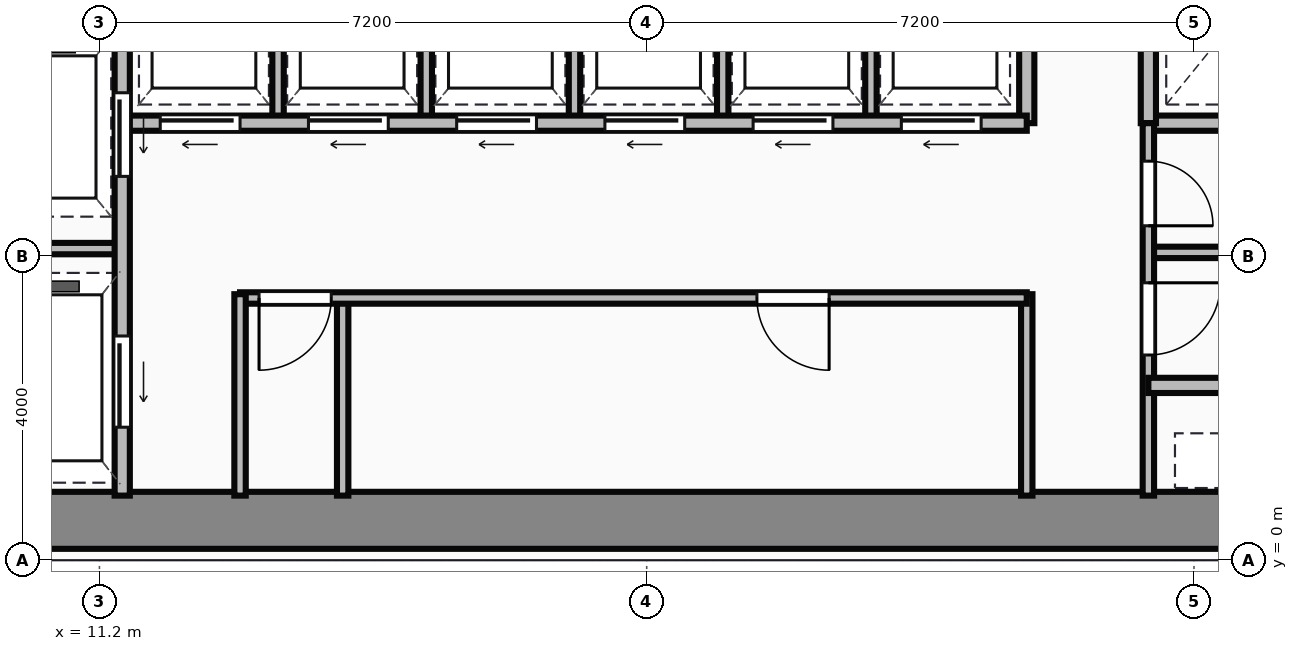
"""IFC4 building model, lengths in metres.
Left out: names, types, materials, properties, quantities, classifications, styles, units other than length and angle.
Written with IfcOpenShell. Run it as: python <this file> out.ifc"""

import sys

from ifc_helpers import new_model, si_unit, direction, frame, frame_2d, origin, place, context, subcontext, project, spatial, rectangle, extrude, source, transform, mapped, element, fill, save


model = new_model("IFC4")
c1 = context("Model", 3, precision=1e-05, world=origin(), true_north=direction((0.0, 1.0)))
c2 = subcontext(c1, "Body", "Model", "MODEL_VIEW")
j1 = project(units=[si_unit("LENGTHUNIT", "METRE"), si_unit("PLANEANGLEUNIT", "RADIAN")], contexts=[c1])
p1 = place(None, origin())
s1 = spatial("IfcSite", under=j1, at=p1, CompositionType="ELEMENT")
p2 = place(p1, origin())
s2 = spatial("IfcBuilding", under=s1, at=p2, CompositionType="ELEMENT")
p3 = place(p2, frame((0.0, 0.0, 166.15)))
s3 = spatial("IfcBuildingStorey", under=s2, at=p3, CompositionType="ELEMENT", Elevation=166.15)
m1 = source(origin(), c2, "Body", "SweptSolid", [
    extrude(rectangle(XDim=29.5, YDim=0.75, at=frame_2d((14.75, 0.0))), origin(), (0.0, 0.0, 1.0), 3.65),
])
p4 = place(p3, frame((4.5, 0.525, 0.0), z_axis=(0.0, 0.0, 1.0), x_axis=(1.0, 0.0, 0.0)))
e1 = element("IfcWall", 1, at=p4, inside=s3, PredefinedType="SHEAR", context=c2, shape_type="MappedRepresentation", body=[
    mapped(m1, transform((0.0, 0.0, 0.0))),
])
m2 = source(origin(), c2, "Body", "SweptSolid", [
    extrude(rectangle(XDim=9.6, YDim=0.2, at=frame_2d((4.8, 0.0))), origin(), (0.0, 0.0, 1.0), 3.4),
])
p5 = place(p3, frame((11.5, 0.85, 0.0), z_axis=(0.0, 0.0, 1.0), x_axis=(0.0, 1.0, 0.0)))
e2 = element("IfcWall", 2, at=p5, inside=s3, PredefinedType="PARTITIONING", context=c2, shape_type="MappedRepresentation", body=[
    mapped(m2, transform((0.0, 0.0, 0.0))),
])
p6 = place(p5, frame((4.2, 0.0, 0.0)))
e3 = element("IfcOpeningElement", 3, at=p6, cuts=e2, PredefinedType="OPENING", context=c2, shape_type="SweptSolid", body=[
    extrude(rectangle(XDim=1.1, YDim=2.15, at=frame_2d((0.55, 1.075))), frame((0.0, 0.11, 0.0), z_axis=(0.0, -1.0, 0.0), x_axis=(1.0, 0.0, 0.0)), (0.0, 0.0, 1.0), 0.22),
])
p7 = place(p5, frame((0.9, 0.0, 0.0)))
e4 = element("IfcOpeningElement", 4, at=p7, cuts=e2, PredefinedType="OPENING", context=c2, shape_type="SweptSolid", body=[
    extrude(rectangle(XDim=1.2, YDim=2.15, at=frame_2d((0.6, 1.075))), frame((0.0, 0.11, 0.0), z_axis=(0.0, -1.0, 0.0), x_axis=(1.0, 0.0, 0.0)), (0.0, 0.0, 1.0), 0.22),
])
m3 = source(origin(), c2, "Body", "SweptSolid", [
    extrude(rectangle(XDim=2.4, YDim=0.15, at=frame_2d((1.2, 0.0))), origin(), (0.0, 0.0, 1.0), 3.4),
])
p8 = place(p3, frame((9.1, 4.1, 0.0), z_axis=(0.0, 0.0, 1.0), x_axis=(1.0, 0.0, 0.0)))
e5 = element("IfcWall", 5, at=p8, inside=s3, PredefinedType="PARTITIONING", context=c2, shape_type="MappedRepresentation", body=[
    mapped(m3, transform((0.0, 0.0, 0.0))),
])
m4 = source(origin(), c2, "Body", "SweptSolid", [
    extrude(rectangle(XDim=2.65, YDim=0.15, at=frame_2d((1.325, 0.0))), origin(), (0.0, 0.0, 1.0), 3.4),
])
p9 = place(p3, frame((13.05, 0.85, 0.0), z_axis=(0.0, 0.0, 1.0), x_axis=(0.0, 1.0, 0.0)))
e6 = element("IfcWall", 6, at=p9, inside=s3, PredefinedType="PARTITIONING", context=c2, shape_type="MappedRepresentation", body=[
    mapped(m4, transform((0.0, 0.0, 0.0))),
])
m5 = source(origin(), c2, "Body", "SweptSolid", [
    extrude(rectangle(XDim=10.35, YDim=0.15, at=frame_2d((5.175, 0.0))), origin(), (0.0, 0.0, 1.0), 3.4),
])
p10 = place(p3, frame((13.05, 3.45, 0.0), z_axis=(0.0, 0.0, 1.0), x_axis=(1.0, 0.0, 0.0)))
e7 = element("IfcWall", 7, at=p10, inside=s3, PredefinedType="PARTITIONING", context=c2, shape_type="MappedRepresentation", body=[
    mapped(m5, transform((0.0, 0.0, 0.0))),
])
p11 = place(p10, frame((0.25, 0.0, 0.0)))
e8 = element("IfcOpeningElement", 8, at=p11, cuts=e7, PredefinedType="OPENING", context=c2, shape_type="SweptSolid", body=[
    extrude(rectangle(XDim=0.95, YDim=2.15, at=frame_2d((0.475, 1.075))), frame((0.0, 0.085, 0.0), z_axis=(0.0, -1.0, 0.0), x_axis=(1.0, 0.0, 0.0)), (0.0, 0.0, 1.0), 0.17),
])
p12 = place(p10, frame((6.8, 0.0, 0.0)))
e9 = element("IfcOpeningElement", 9, at=p12, cuts=e7, PredefinedType="OPENING", context=c2, shape_type="SweptSolid", body=[
    extrude(rectangle(XDim=0.95, YDim=2.15, at=frame_2d((0.475, 1.075))), frame((0.0, 0.085, 0.0), z_axis=(0.0, -1.0, 0.0), x_axis=(1.0, 0.0, 0.0)), (0.0, 0.0, 1.0), 0.17),
])
p13 = place(p3, frame((23.4, 0.85, 0.0), z_axis=(0.0, 0.0, 1.0), x_axis=(0.0, 1.0, 0.0)))
e10 = element("IfcWall", 10, at=p13, inside=s3, PredefinedType="PARTITIONING", context=c2, shape_type="MappedRepresentation", body=[
    mapped(m4, transform((0.0, 0.0, 0.0))),
])
m6 = source(origin(), c2, "Body", "SweptSolid", [
    extrude(rectangle(XDim=2.6, YDim=0.15, at=frame_2d((1.3, 0.0))), origin(), (0.0, 0.0, 1.0), 3.4),
])
p14 = place(p3, frame((14.4, 0.85, 0.0), z_axis=(0.0, 0.0, 1.0), x_axis=(0.0, 1.0, 0.0)))
e11 = element("IfcWall", 11, at=p14, inside=s3, PredefinedType="PARTITIONING", context=c2, shape_type="MappedRepresentation", body=[
    mapped(m6, transform((0.0, 0.0, 0.0))),
])
m7 = source(origin(), c2, "Body", "SweptSolid", [
    extrude(rectangle(XDim=11.85, YDim=0.2, at=frame_2d((5.925, 0.0))), origin(), (0.0, 0.0, 1.0), 3.4),
])
p15 = place(p3, frame((11.55, 5.75, 0.0), z_axis=(0.0, 0.0, 1.0), x_axis=(1.0, 0.0, 0.0)))
e12 = element("IfcWall", 12, at=p15, inside=s3, PredefinedType="PARTITIONING", context=c2, shape_type="MappedRepresentation", body=[
    mapped(m7, transform((0.0, 0.0, 0.0))),
])
p16 = place(p15, frame((0.45, 0.0, 0.0)))
e13 = element("IfcOpeningElement", 13, at=p16, cuts=e12, PredefinedType="OPENING", context=c2, shape_type="SweptSolid", body=[
    extrude(rectangle(XDim=1.05, YDim=2.15, at=frame_2d((0.525, 1.075))), frame((0.0, 0.11, 0.0), z_axis=(0.0, -1.0, 0.0), x_axis=(1.0, 0.0, 0.0)), (0.0, 0.0, 1.0), 0.22),
])
p17 = place(p15, frame((2.4, 0.0, 0.0)))
e14 = element("IfcOpeningElement", 14, at=p17, cuts=e12, PredefinedType="OPENING", context=c2, shape_type="SweptSolid", body=[
    extrude(rectangle(XDim=1.05, YDim=2.15, at=frame_2d((0.525, 1.075))), frame((0.0, 0.11, 0.0), z_axis=(0.0, -1.0, 0.0), x_axis=(1.0, 0.0, 0.0)), (0.0, 0.0, 1.0), 0.22),
])
p18 = place(p15, frame((4.35, 0.0, 0.0)))
e15 = element("IfcOpeningElement", 15, at=p18, cuts=e12, PredefinedType="OPENING", context=c2, shape_type="SweptSolid", body=[
    extrude(rectangle(XDim=1.05, YDim=2.15, at=frame_2d((0.525, 1.075))), frame((0.0, 0.11, 0.0), z_axis=(0.0, -1.0, 0.0), x_axis=(1.0, 0.0, 0.0)), (0.0, 0.0, 1.0), 0.22),
])
p19 = place(p15, frame((6.3, 0.0, 0.0)))
e16 = element("IfcOpeningElement", 16, at=p19, cuts=e12, PredefinedType="OPENING", context=c2, shape_type="SweptSolid", body=[
    extrude(rectangle(XDim=1.05, YDim=2.15, at=frame_2d((0.525, 1.075))), frame((0.0, 0.11, 0.0), z_axis=(0.0, -1.0, 0.0), x_axis=(1.0, 0.0, 0.0)), (0.0, 0.0, 1.0), 0.22),
])
p20 = place(p15, frame((8.25, 0.0, 0.0)))
e17 = element("IfcOpeningElement", 17, at=p20, cuts=e12, PredefinedType="OPENING", context=c2, shape_type="SweptSolid", body=[
    extrude(rectangle(XDim=1.05, YDim=2.15, at=frame_2d((0.525, 1.075))), frame((0.0, 0.11, 0.0), z_axis=(0.0, -1.0, 0.0), x_axis=(1.0, 0.0, 0.0)), (0.0, 0.0, 1.0), 0.22),
])
p21 = place(p15, frame((10.2, 0.0, 0.0)))
e18 = element("IfcOpeningElement", 18, at=p21, cuts=e12, PredefinedType="OPENING", context=c2, shape_type="SweptSolid", body=[
    extrude(rectangle(XDim=1.05, YDim=2.15, at=frame_2d((0.525, 1.075))), frame((0.0, 0.11, 0.0), z_axis=(0.0, -1.0, 0.0), x_axis=(1.0, 0.0, 0.0)), (0.0, 0.0, 1.0), 0.22),
])
m8 = source(origin(), c2, "Body", "SweptSolid", [
    extrude(rectangle(XDim=2.6, YDim=0.2, at=frame_2d((1.3, 0.0))), origin(), (0.0, 0.0, 1.0), 3.4),
])
p22 = place(p3, frame((23.4, 5.75, 0.0), z_axis=(0.0, 0.0, 1.0), x_axis=(0.0, 1.0, 0.0)))
e19 = element("IfcWall", 19, at=p22, inside=s3, PredefinedType="PARTITIONING", context=c2, shape_type="MappedRepresentation", body=[
    mapped(m8, transform((0.0, 0.0, 0.0))),
])
m9 = source(origin(), c2, "Body", "SweptSolid", [
    extrude(rectangle(XDim=2.5, YDim=0.15, at=frame_2d((1.25, 0.0))), origin(), (0.0, 0.0, 1.0), 3.4),
])
for number, where, z_axis, x_axis in (
    (20, (13.55, 5.8, 0.0), (0.0, 0.0, 1.0), (0.0, 1.0, 0.0)),
    (21, (15.5, 5.8, 0.0), (0.0, 0.0, 1.0), (0.0, 1.0, 0.0)),
    (22, (17.45, 5.8, 0.0), (0.0, 0.0, 1.0), (0.0, 1.0, 0.0)),
    (23, (19.4, 5.8, 0.0), (0.0, 0.0, 1.0), (0.0, 1.0, 0.0)),
    (24, (21.35, 5.8, 0.0), (0.0, 0.0, 1.0), (0.0, 1.0, 0.0)),
):
    element("IfcWall", number, at=place(p3, frame(where, z_axis=z_axis, x_axis=x_axis)), inside=s3, PredefinedType="PARTITIONING", context=c2, shape_type="MappedRepresentation", body=[
        mapped(m9, transform((0.0, 0.0, 0.0))),
    ])
m10 = source(origin(), c2, "Body", "SweptSolid", [
    extrude(rectangle(XDim=4.55, YDim=0.2, at=frame_2d((2.275, 0.0))), origin(), (0.0, 0.0, 1.0), 3.4),
])
p23 = place(p3, frame((25.0, 5.75, 0.0), z_axis=(0.0, 0.0, 1.0), x_axis=(1.0, 0.0, 0.0)))
e25 = element("IfcWall", 25, at=p23, inside=s3, PredefinedType="PARTITIONING", context=c2, shape_type="MappedRepresentation", body=[
    mapped(m10, transform((0.0, 0.0, 0.0))),
])
p24 = place(p3, frame((25.0, 5.75, 0.0), z_axis=(0.0, 0.0, 1.0), x_axis=(0.0, 1.0, 0.0)))
e26 = element("IfcWall", 26, at=p24, inside=s3, PredefinedType="PARTITIONING", context=c2, shape_type="MappedRepresentation", body=[
    mapped(m8, transform((0.0, 0.0, 0.0))),
])
m11 = source(origin(), c2, "Body", "SweptSolid", [
    extrude(rectangle(XDim=4.9, YDim=0.15, at=frame_2d((2.45, 0.0))), origin(), (0.0, 0.0, 1.0), 3.4),
])
p25 = place(p3, frame((25.0, 0.85, 0.0), z_axis=(0.0, 0.0, 1.0), x_axis=(0.0, 1.0, 0.0)))
e27 = element("IfcWall", 27, at=p25, inside=s3, PredefinedType="PARTITIONING", context=c2, shape_type="MappedRepresentation", body=[
    mapped(m11, transform((0.0, 0.0, 0.0))),
])
p26 = place(p25, frame((1.85, 0.0, 0.0)))
e28 = element("IfcOpeningElement", 28, at=p26, cuts=e27, PredefinedType="OPENING", context=c2, shape_type="SweptSolid", body=[
    extrude(rectangle(XDim=0.95, YDim=2.15, at=frame_2d((0.475, 1.075))), frame((0.0, 0.085, 0.0), z_axis=(0.0, -1.0, 0.0), x_axis=(1.0, 0.0, 0.0)), (0.0, 0.0, 1.0), 0.17),
])
p27 = place(p25, frame((3.55, 0.0, 0.0)))
e29 = element("IfcOpeningElement", 29, at=p27, cuts=e27, PredefinedType="OPENING", context=c2, shape_type="SweptSolid", body=[
    extrude(rectangle(XDim=0.85, YDim=2.15, at=frame_2d((0.425, 1.075))), frame((0.0, 0.085, 0.0), z_axis=(0.0, -1.0, 0.0), x_axis=(1.0, 0.0, 0.0)), (0.0, 0.0, 1.0), 0.17),
])
m12 = source(origin(), c2, "Body", "SweptSolid", [
    extrude(rectangle(XDim=2.4, YDim=0.2, at=frame_2d((1.2, 0.0))), origin(), (0.0, 0.0, 1.0), 3.4),
])
p28 = place(p3, frame((25.0, 2.3, 0.0), z_axis=(0.0, 0.0, 1.0), x_axis=(1.0, 0.0, 0.0)))
e30 = element("IfcWall", 30, at=p28, inside=s3, PredefinedType="PARTITIONING", context=c2, shape_type="MappedRepresentation", body=[
    mapped(m12, transform((0.0, 0.0, 0.0))),
])
m13 = source(origin(), c2, "Body", "SweptSolid", [
    extrude(rectangle(XDim=4.55, YDim=0.15, at=frame_2d((2.275, 0.0))), origin(), (0.0, 0.0, 1.0), 3.4),
])
p29 = place(p3, frame((25.0, 4.05, 0.0), z_axis=(0.0, 0.0, 1.0), x_axis=(1.0, 0.0, 0.0)))
e31 = element("IfcWall", 31, at=p29, inside=s3, PredefinedType="PARTITIONING", context=c2, shape_type="MappedRepresentation", body=[
    mapped(m13, transform((0.0, 0.0, 0.0))),
])
m14 = source(origin(), c2, "Body", "SweptSolid", [
    extrude(rectangle(XDim=1.1, YDim=2.15, at=frame_2d((0.55, 1.075))), frame((0.0, 0.025, 0.0), z_axis=(0.0, -1.0, 0.0), x_axis=(1.0, 0.0, 0.0)), (0.0, 0.0, 1.0), 0.05),
])
p30 = place(p6, frame((1.1, 0.0, 0.0), z_axis=(0.0, 0.0, 1.0), x_axis=(-1.0, 0.0, 0.0)))
e32 = element("IfcDoor", 32, at=p30, inside=s3, OperationType="SLIDING_TO_LEFT", PredefinedType="DOOR", context=c2, shape_type="MappedRepresentation", body=[
    mapped(m14, transform((0.0, 0.0, 0.0))),
])
fill(e3, e32)
m15 = source(origin(), c2, "Body", "SweptSolid", [
    extrude(rectangle(XDim=1.2, YDim=2.15, at=frame_2d((0.6, 1.075))), frame((0.0, 0.025, 0.0), z_axis=(0.0, -1.0, 0.0), x_axis=(1.0, 0.0, 0.0)), (0.0, 0.0, 1.0), 0.05),
])
p31 = place(p7, frame((1.2, 0.0, 0.0), z_axis=(0.0, 0.0, 1.0), x_axis=(-1.0, 0.0, 0.0)))
e33 = element("IfcDoor", 33, at=p31, inside=s3, OperationType="SLIDING_TO_LEFT", PredefinedType="DOOR", context=c2, shape_type="MappedRepresentation", body=[
    mapped(m15, transform((0.0, 0.0, 0.0))),
])
fill(e4, e33)
m16 = source(origin(), c2, "Body", "SweptSolid", [
    extrude(rectangle(XDim=0.95, YDim=2.15, at=frame_2d((0.475, 1.075))), frame((0.0, 0.025, 0.0), z_axis=(0.0, -1.0, 0.0), x_axis=(1.0, 0.0, 0.0)), (0.0, 0.0, 1.0), 0.05),
])
p32 = place(p11, origin())
e34 = element("IfcDoor", 34, at=p32, inside=s3, OperationType="SINGLE_SWING_LEFT", PredefinedType="DOOR", context=c2, shape_type="MappedRepresentation", body=[
    mapped(m16, transform((0.0, 0.0, 0.0))),
])
fill(e8, e34)
p33 = place(p12, origin())
e35 = element("IfcDoor", 35, at=p33, inside=s3, OperationType="SINGLE_SWING_RIGHT", PredefinedType="DOOR", context=c2, shape_type="MappedRepresentation", body=[
    mapped(m16, transform((0.0, 0.0, 0.0))),
])
fill(e9, e35)
m17 = source(origin(), c2, "Body", "SweptSolid", [
    extrude(rectangle(XDim=1.05, YDim=2.15, at=frame_2d((0.525, 1.075))), frame((0.0, 0.025, 0.0), z_axis=(0.0, -1.0, 0.0), x_axis=(1.0, 0.0, 0.0)), (0.0, 0.0, 1.0), 0.05),
])
p34 = place(p16, frame((1.05, 0.0, 0.0), z_axis=(0.0, 0.0, 1.0), x_axis=(-1.0, 0.0, 0.0)))
e36 = element("IfcDoor", 36, at=p34, inside=s3, OperationType="SLIDING_TO_LEFT", PredefinedType="DOOR", context=c2, shape_type="MappedRepresentation", body=[
    mapped(m17, transform((0.0, 0.0, 0.0))),
])
fill(e13, e36)
p35 = place(p17, frame((1.05, 0.0, 0.0), z_axis=(0.0, 0.0, 1.0), x_axis=(-1.0, 0.0, 0.0)))
e37 = element("IfcDoor", 37, at=p35, inside=s3, OperationType="SLIDING_TO_LEFT", PredefinedType="DOOR", context=c2, shape_type="MappedRepresentation", body=[
    mapped(m17, transform((0.0, 0.0, 0.0))),
])
fill(e14, e37)
p36 = place(p18, frame((1.05, 0.0, 0.0), z_axis=(0.0, 0.0, 1.0), x_axis=(-1.0, 0.0, 0.0)))
e38 = element("IfcDoor", 38, at=p36, inside=s3, OperationType="SLIDING_TO_LEFT", PredefinedType="DOOR", context=c2, shape_type="MappedRepresentation", body=[
    mapped(m17, transform((0.0, 0.0, 0.0))),
])
fill(e15, e38)
p37 = place(p19, frame((1.05, 0.0, 0.0), z_axis=(0.0, 0.0, 1.0), x_axis=(-1.0, 0.0, 0.0)))
e39 = element("IfcDoor", 39, at=p37, inside=s3, OperationType="SLIDING_TO_LEFT", PredefinedType="DOOR", context=c2, shape_type="MappedRepresentation", body=[
    mapped(m17, transform((0.0, 0.0, 0.0))),
])
fill(e16, e39)
p38 = place(p20, frame((1.05, 0.0, 0.0), z_axis=(0.0, 0.0, 1.0), x_axis=(-1.0, 0.0, 0.0)))
e40 = element("IfcDoor", 40, at=p38, inside=s3, OperationType="SLIDING_TO_LEFT", PredefinedType="DOOR", context=c2, shape_type="MappedRepresentation", body=[
    mapped(m17, transform((0.0, 0.0, 0.0))),
])
fill(e17, e40)
p39 = place(p21, frame((1.05, 0.0, 0.0), z_axis=(0.0, 0.0, 1.0), x_axis=(-1.0, 0.0, 0.0)))
e41 = element("IfcDoor", 41, at=p39, inside=s3, OperationType="SLIDING_TO_LEFT", PredefinedType="DOOR", context=c2, shape_type="MappedRepresentation", body=[
    mapped(m17, transform((0.0, 0.0, 0.0))),
])
fill(e18, e41)
p40 = place(p26, origin())
e42 = element("IfcDoor", 42, at=p40, inside=s3, OperationType="SINGLE_SWING_RIGHT", PredefinedType="DOOR", context=c2, shape_type="MappedRepresentation", body=[
    mapped(m16, transform((0.0, 0.0, 0.0))),
])
fill(e28, e42)
m18 = source(origin(), c2, "Body", "SweptSolid", [
    extrude(rectangle(XDim=0.85, YDim=2.15, at=frame_2d((0.425, 1.075))), frame((0.0, 0.025, 0.0), z_axis=(0.0, -1.0, 0.0), x_axis=(1.0, 0.0, 0.0)), (0.0, 0.0, 1.0), 0.05),
])
p41 = place(p27, origin())
e43 = element("IfcDoor", 43, at=p41, inside=s3, OperationType="SINGLE_SWING_LEFT", PredefinedType="DOOR", context=c2, shape_type="MappedRepresentation", body=[
    mapped(m18, transform((0.0, 0.0, 0.0))),
])
fill(e29, e43)
save(model, sys.argv[1])
